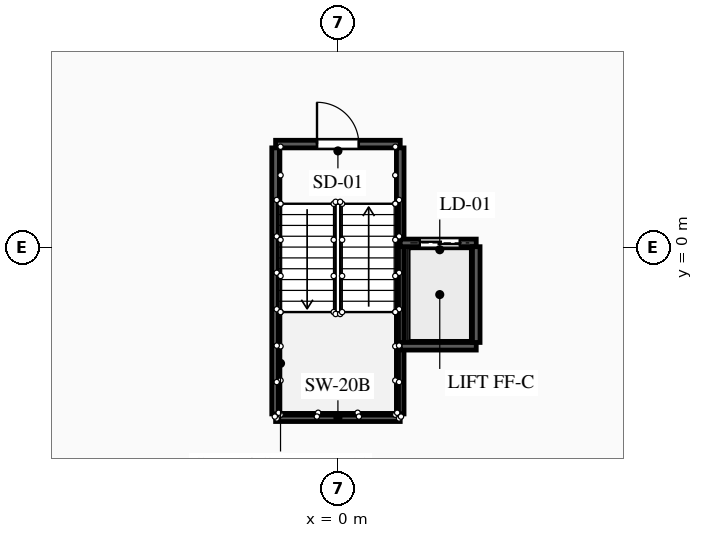
"""IFC4 building model, lengths in metres.
Left out: names, types, materials, properties, quantities, classifications, styles, units other than length and angle.
Written with IfcOpenShell. Run it as: python <this file> out.ifc"""

import sys

from ifc_helpers import new_model, si_unit, direction, frame, frame_2d, origin, place, context, subcontext, project, spatial, rectangle, extrude, element, fill, save


model = new_model("IFC4")
c1 = context("Model", 3, precision=1e-05, world=origin(), true_north=direction((0.0, 1.0)))
c2 = subcontext(c1, "Body", "Model", "MODEL_VIEW")
j1 = project(units=[si_unit("LENGTHUNIT", "METRE"), si_unit("PLANEANGLEUNIT", "RADIAN")], contexts=[c1])
p1 = place(None, origin())
s1 = spatial("IfcSite", under=j1, at=p1, CompositionType="ELEMENT")
p2 = place(p1, origin())
s2 = spatial("IfcBuilding", under=s1, at=p2, CompositionType="ELEMENT")
p3 = place(p2, frame((0.0, 0.0, 274.0)))
s3 = spatial("IfcBuildingStorey", under=s2, at=p3, CompositionType="ELEMENT", Elevation=274.0)
p4 = place(p3, frame((-1.64, 2.72, 0.0), z_axis=(0.0, 0.0, 1.0), x_axis=(1.0, 0.0, 0.0)))
e1 = element("IfcWall", 1, at=p4, inside=s3, PredefinedType="SHEAR", context=c2, shape_type="SweptSolid", body=[
    extrude(rectangle(XDim=3.28, YDim=0.2, at=frame_2d((1.64, 0.0))), origin(), (0.0, 0.0, 1.0), 3.4),
])
p5 = place(p4, frame((1.09, 0.0, 0.0)))
e2 = element("IfcOpeningElement", 2, at=p5, cuts=e1, PredefinedType="OPENING", context=c2, shape_type="SweptSolid", body=[
    extrude(rectangle(XDim=1.1, YDim=2.15, at=frame_2d((0.55, 1.075))), frame((0.0, 0.11, 0.0), z_axis=(0.0, -1.0, 0.0), x_axis=(1.0, 0.0, 0.0)), (0.0, 0.0, 1.0), 0.22),
])
p6 = place(p3, frame((-1.64, -4.48, 0.0), z_axis=(0.0, 0.0, 1.0), x_axis=(1.0, 0.0, 0.0)))
e3 = element("IfcWall", 3, at=p6, inside=s3, PredefinedType="SHEAR", context=c2, shape_type="SweptSolid", body=[
    extrude(rectangle(XDim=3.28, YDim=0.2, at=frame_2d((1.64, 0.0))), origin(), (0.0, 0.0, 1.0), 3.4),
])
for number, where, z_axis, x_axis in (
    (4, (-1.64, -4.38, 0.0), (0.0, 0.0, 1.0), (0.0, 1.0, 0.0)),
    (5, (1.64, -4.38, 0.0), (0.0, 0.0, 1.0), (0.0, 1.0, 0.0)),
):
    element("IfcWall", number, at=place(p3, frame(where, z_axis=z_axis, x_axis=x_axis)), inside=s3, PredefinedType="SHEAR", context=c2, shape_type="SweptSolid", body=[
        extrude(rectangle(XDim=7.0, YDim=0.2, at=frame_2d((3.5, 0.0))), origin(), (0.0, 0.0, 1.0), 3.4),
    ])
p7 = place(p3, frame((1.64, 0.12, 0.0), z_axis=(0.0, 0.0, 1.0), x_axis=(1.0, 0.0, 0.0)))
e6 = element("IfcWall", 6, at=p7, inside=s3, PredefinedType="SHEAR", context=c2, shape_type="SweptSolid", body=[
    extrude(rectangle(XDim=2.0, YDim=0.2, at=frame_2d((1.0, 0.0))), origin(), (0.0, 0.0, 1.0), 3.4),
])
p8 = place(p7, frame((0.515, 0.0, 0.0)))
e7 = element("IfcOpeningElement", 7, at=p8, cuts=e6, PredefinedType="OPENING", context=c2, shape_type="SweptSolid", body=[
    extrude(rectangle(XDim=1.05, YDim=2.1, at=frame_2d((0.525, 1.05))), frame((0.0, 0.11, 0.0), z_axis=(0.0, -1.0, 0.0), x_axis=(1.0, 0.0, 0.0)), (0.0, 0.0, 1.0), 0.22),
])
p9 = place(p3, frame((1.64, -2.6, 0.0), z_axis=(0.0, 0.0, 1.0), x_axis=(1.0, 0.0, 0.0)))
e8 = element("IfcWall", 8, at=p9, inside=s3, PredefinedType="SHEAR", context=c2, shape_type="SweptSolid", body=[
    extrude(rectangle(XDim=2.0, YDim=0.2, at=frame_2d((1.0, 0.0))), origin(), (0.0, 0.0, 1.0), 3.4),
])
p10 = place(p3, frame((3.64, -2.5, 0.0), z_axis=(0.0, 0.0, 1.0), x_axis=(0.0, 1.0, 0.0)))
e9 = element("IfcWall", 9, at=p10, inside=s3, PredefinedType="SHEAR", context=c2, shape_type="SweptSolid", body=[
    extrude(rectangle(XDim=2.52, YDim=0.2, at=frame_2d((1.26, 0.0))), origin(), (0.0, 0.0, 1.0), 3.4),
])
p11 = place(p5, origin())
e10 = element("IfcDoor", 10, at=p11, inside=s3, OperationType="SINGLE_SWING_LEFT", PredefinedType="DOOR", context=c2, shape_type="SweptSolid", body=[
    extrude(rectangle(XDim=1.1, YDim=2.15, at=frame_2d((0.55, 1.075))), frame((0.0, 0.025, 0.0), z_axis=(0.0, -1.0, 0.0), x_axis=(1.0, 0.0, 0.0)), (0.0, 0.0, 1.0), 0.05),
])
fill(e2, e10)
p12 = place(p8, origin())
e11 = element("IfcDoor", 11, at=p12, inside=s3, OperationType="DOUBLE_DOOR_SLIDING", PredefinedType="DOOR", context=c2, shape_type="SweptSolid", body=[
    extrude(rectangle(XDim=1.05, YDim=2.1, at=frame_2d((0.525, 1.05))), frame((0.0, 0.025, 0.0), z_axis=(0.0, -1.0, 0.0), x_axis=(1.0, 0.0, 0.0)), (0.0, 0.0, 1.0), 0.05),
])
fill(e7, e11)
save(model, sys.argv[1])
